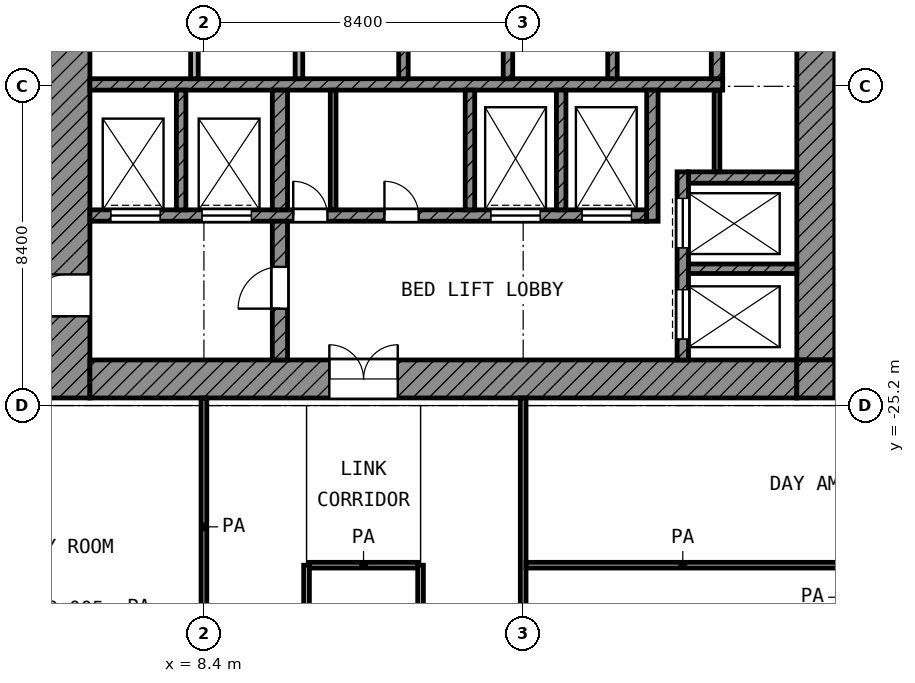
"""IFC4 building model, lengths in metres.
Left out: names, types, materials, properties, quantities, classifications, styles, units other than length and angle.
Written with IfcOpenShell. Run it as: python <this file> out.ifc"""

import sys

from ifc_helpers import new_model, si_unit, direction, frame, frame_2d, origin, place, context, subcontext, project, spatial, rectangle, extrude, element, fill, save


model = new_model("IFC4")
c1 = context("Model", 3, precision=1e-05, world=origin(), true_north=direction((0.0, 1.0)))
c2 = subcontext(c1, "Body", "Model", "MODEL_VIEW")
j1 = project(units=[si_unit("LENGTHUNIT", "METRE"), si_unit("PLANEANGLEUNIT", "RADIAN")], contexts=[c1])
p1 = place(None, origin())
s1 = spatial("IfcSite", under=j1, at=p1, CompositionType="ELEMENT")
p2 = place(p1, origin())
s2 = spatial("IfcBuilding", under=s1, at=p2, CompositionType="ELEMENT")
p3 = place(p2, frame((0.0, 0.0, 128.2)))
s3 = spatial("IfcBuildingStorey", under=s2, at=p3, CompositionType="ELEMENT", Elevation=128.2)
p4 = place(p3, frame((4.8, -25.0, 0.0), z_axis=(0.0, 0.0, 1.0), x_axis=(0.0, 1.0, 0.0)))
e1 = element("IfcWall", 1, at=p4, inside=s3, PredefinedType="SHEAR", context=c2, shape_type="SweptSolid", body=[
    extrude(rectangle(XDim=19.6, YDim=1.2, at=frame_2d((9.8, 0.0))), origin(), (0.0, 0.0, 1.0), 3.6),
])
p5 = place(p4, frame((11.45, 0.0, 0.0)))
e2 = element("IfcOpeningElement", 2, at=p5, cuts=e1, PredefinedType="OPENING", context=c2, shape_type="SweptSolid", body=[
    extrude(rectangle(XDim=1.1, YDim=2.1, at=frame_2d((0.55, 1.05))), frame((0.0, 0.61, 0.0), z_axis=(0.0, -1.0, 0.0), x_axis=(1.0, 0.0, 0.0)), (0.0, 0.0, 1.0), 1.22),
])
p6 = place(p4, frame((2.15, 0.0, 0.0)))
e3 = element("IfcOpeningElement", 3, at=p6, cuts=e1, PredefinedType="OPENING", context=c2, shape_type="SweptSolid", body=[
    extrude(rectangle(XDim=1.1, YDim=2.1, at=frame_2d((0.55, 1.05))), frame((0.0, 0.61, 0.0), z_axis=(0.0, -1.0, 0.0), x_axis=(1.0, 0.0, 0.0)), (0.0, 0.0, 1.0), 1.22),
])
p7 = place(p3, frame((24.5, -24.0, 0.0), z_axis=(0.0, 0.0, 1.0), x_axis=(0.0, 1.0, 0.0)))
e4 = element("IfcWall", 4, at=p7, inside=s3, PredefinedType="SHEAR", context=c2, shape_type="SweptSolid", body=[
    extrude(rectangle(XDim=18.6, YDim=1.0, at=frame_2d((9.3, 0.0))), origin(), (0.0, 0.0, 1.0), 3.6),
])
p8 = place(p7, frame((10.5, 0.0, 0.0)))
e5 = element("IfcOpeningElement", 5, at=p8, cuts=e4, PredefinedType="OPENING", context=c2, shape_type="SweptSolid", body=[
    extrude(rectangle(XDim=1.8, YDim=2.1, at=frame_2d((0.9, 1.05))), frame((0.0, 0.51, 0.0), z_axis=(0.0, -1.0, 0.0), x_axis=(1.0, 0.0, 0.0)), (0.0, 0.0, 1.0), 1.02),
])
p9 = place(p3, frame((5.4, -24.5, 0.0), z_axis=(0.0, 0.0, 1.0), x_axis=(1.0, 0.0, 0.0)))
e6 = element("IfcWall", 6, at=p9, inside=s3, PredefinedType="SHEAR", context=c2, shape_type="SweptSolid", body=[
    extrude(rectangle(XDim=18.6, YDim=1.0, at=frame_2d((9.3, 0.0))), origin(), (0.0, 0.0, 1.0), 3.6),
])
p10 = place(p9, frame((6.3, 0.0, 0.0)))
e7 = element("IfcOpeningElement", 7, at=p10, cuts=e6, PredefinedType="OPENING", context=c2, shape_type="SweptSolid", body=[
    extrude(rectangle(XDim=1.8, YDim=2.1, at=frame_2d((0.9, 1.05))), frame((0.0, 0.51, 0.0), z_axis=(0.0, -1.0, 0.0), x_axis=(1.0, 0.0, 0.0)), (0.0, 0.0, 1.0), 1.02),
])
p11 = place(p3, frame((24.5, -25.0, 0.0), z_axis=(0.0, 0.0, 1.0), x_axis=(0.0, 1.0, 0.0)))
e8 = element("IfcWall", 8, at=p11, inside=s3, PredefinedType="SHEAR", context=c2, shape_type="SweptSolid", body=[
    extrude(rectangle(XDim=1.0, YDim=1.0, at=frame_2d((0.5, 0.0))), origin(), (0.0, 0.0, 1.0), 3.6),
])
p12 = place(p3, frame((5.4, -16.75, 0.0), z_axis=(0.0, 0.0, 1.0), x_axis=(1.0, 0.0, 0.0)))
e9 = element("IfcWall", 9, at=p12, inside=s3, PredefinedType="SHEAR", context=c2, shape_type="SweptSolid", body=[
    extrude(rectangle(XDim=16.65, YDim=0.3, at=frame_2d((8.325, 0.0))), origin(), (0.0, 0.0, 1.0), 3.6),
])
p13 = place(p3, frame((5.4, -20.2, 0.0), z_axis=(0.0, 0.0, 1.0), x_axis=(1.0, 0.0, 0.0)))
e10 = element("IfcWall", 10, at=p13, inside=s3, PredefinedType="SHEAR", context=c2, shape_type="SweptSolid", body=[
    extrude(rectangle(XDim=14.65, YDim=0.3, at=frame_2d((7.325, 0.0))), origin(), (0.0, 0.0, 1.0), 3.6),
])
p14 = place(p13, frame((10.55, 0.0, 0.0)))
e11 = element("IfcOpeningElement", 11, at=p14, cuts=e10, PredefinedType="OPENING", context=c2, shape_type="SweptSolid", body=[
    extrude(rectangle(XDim=1.3, YDim=2.1, at=frame_2d((0.65, 1.05))), frame((0.0, 0.16, 0.0), z_axis=(0.0, -1.0, 0.0), x_axis=(1.0, 0.0, 0.0)), (0.0, 0.0, 1.0), 0.32),
])
p15 = place(p13, frame((12.95, 0.0, 0.0)))
e12 = element("IfcOpeningElement", 12, at=p15, cuts=e10, PredefinedType="OPENING", context=c2, shape_type="SweptSolid", body=[
    extrude(rectangle(XDim=1.3, YDim=2.1, at=frame_2d((0.65, 1.05))), frame((0.0, 0.16, 0.0), z_axis=(0.0, -1.0, 0.0), x_axis=(1.0, 0.0, 0.0)), (0.0, 0.0, 1.0), 0.32),
])
p16 = place(p13, frame((0.55, 0.0, 0.0)))
e13 = element("IfcOpeningElement", 13, at=p16, cuts=e10, PredefinedType="OPENING", context=c2, shape_type="SweptSolid", body=[
    extrude(rectangle(XDim=1.3, YDim=2.1, at=frame_2d((0.65, 1.05))), frame((0.0, 0.16, 0.0), z_axis=(0.0, -1.0, 0.0), x_axis=(1.0, 0.0, 0.0)), (0.0, 0.0, 1.0), 0.32),
])
p17 = place(p13, frame((2.95, 0.0, 0.0)))
e14 = element("IfcOpeningElement", 14, at=p17, cuts=e10, PredefinedType="OPENING", context=c2, shape_type="SweptSolid", body=[
    extrude(rectangle(XDim=1.3, YDim=2.1, at=frame_2d((0.65, 1.05))), frame((0.0, 0.16, 0.0), z_axis=(0.0, -1.0, 0.0), x_axis=(1.0, 0.0, 0.0)), (0.0, 0.0, 1.0), 0.32),
])
p18 = place(p13, frame((5.35, 0.0, 0.0)))
e15 = element("IfcOpeningElement", 15, at=p18, cuts=e10, PredefinedType="OPENING", context=c2, shape_type="SweptSolid", body=[
    extrude(rectangle(XDim=0.9, YDim=2.1, at=frame_2d((0.45, 1.05))), frame((0.0, 0.16, 0.0), z_axis=(0.0, -1.0, 0.0), x_axis=(1.0, 0.0, 0.0)), (0.0, 0.0, 1.0), 0.32),
])
p19 = place(p13, frame((7.75, 0.0, 0.0)))
e16 = element("IfcOpeningElement", 16, at=p19, cuts=e10, PredefinedType="OPENING", context=c2, shape_type="SweptSolid", body=[
    extrude(rectangle(XDim=0.9, YDim=2.1, at=frame_2d((0.45, 1.05))), frame((0.0, 0.16, 0.0), z_axis=(0.0, -1.0, 0.0), x_axis=(1.0, 0.0, 0.0)), (0.0, 0.0, 1.0), 0.32),
])
p20 = place(p3, frame((10.4, -24.0, 0.0), z_axis=(0.0, 0.0, 1.0), x_axis=(0.0, 1.0, 0.0)))
e17 = element("IfcWall", 17, at=p20, inside=s3, PredefinedType="SHEAR", context=c2, shape_type="SweptSolid", body=[
    extrude(rectangle(XDim=3.65, YDim=0.4, at=frame_2d((1.825, 0.0))), origin(), (0.0, 0.0, 1.0), 3.6),
])
p21 = place(p20, frame((1.35, 0.0, 0.0)))
e18 = element("IfcOpeningElement", 18, at=p21, cuts=e17, PredefinedType="OPENING", context=c2, shape_type="SweptSolid", body=[
    extrude(rectangle(XDim=1.1, YDim=2.1, at=frame_2d((0.55, 1.05))), frame((0.0, 0.21, 0.0), z_axis=(0.0, -1.0, 0.0), x_axis=(1.0, 0.0, 0.0)), (0.0, 0.0, 1.0), 0.42),
])
p22 = place(p3, frame((10.4, -20.05, 0.0), z_axis=(0.0, 0.0, 1.0), x_axis=(0.0, 1.0, 0.0)))
e19 = element("IfcWall", 19, at=p22, inside=s3, PredefinedType="SHEAR", context=c2, shape_type="SweptSolid", body=[
    extrude(rectangle(XDim=3.15, YDim=0.4, at=frame_2d((1.575, 0.0))), origin(), (0.0, 0.0, 1.0), 3.6),
])
p23 = place(p3, frame((20.2, -20.35, 0.0), z_axis=(0.0, 0.0, 1.0), x_axis=(0.0, 1.0, 0.0)))
e20 = element("IfcWall", 20, at=p23, inside=s3, PredefinedType="SHEAR", context=c2, shape_type="SweptSolid", body=[
    extrude(rectangle(XDim=3.45, YDim=0.3, at=frame_2d((1.725, 0.0))), origin(), (0.0, 0.0, 1.0), 3.6),
])
p24 = place(p3, frame((21.9, -16.6, 0.0), z_axis=(0.0, 0.0, 1.0), x_axis=(0.0, 1.0, 0.0)))
e21 = element("IfcWall", 21, at=p24, inside=s3, PredefinedType="SHEAR", context=c2, shape_type="SweptSolid", body=[
    extrude(rectangle(XDim=2.35, YDim=0.3, at=frame_2d((1.175, 0.0))), origin(), (0.0, 0.0, 1.0), 3.6),
])
p25 = place(p3, frame((21.15, -19.2, 0.0), z_axis=(0.0, 0.0, 1.0), x_axis=(1.0, 0.0, 0.0)))
e22 = element("IfcWall", 22, at=p25, inside=s3, PredefinedType="SHEAR", context=c2, shape_type="SweptSolid", body=[
    extrude(rectangle(XDim=2.85, YDim=0.3, at=frame_2d((1.425, 0.0))), origin(), (0.0, 0.0, 1.0), 3.6),
])
p26 = place(p3, frame((21.0, -24.0, 0.0), z_axis=(0.0, 0.0, 1.0), x_axis=(0.0, 1.0, 0.0)))
e23 = element("IfcWall", 23, at=p26, inside=s3, PredefinedType="SHEAR", context=c2, shape_type="SweptSolid", body=[
    extrude(rectangle(XDim=4.95, YDim=0.3, at=frame_2d((2.475, 0.0))), origin(), (0.0, 0.0, 1.0), 3.6),
])
p27 = place(p26, frame((2.95, 0.0, 0.0)))
e24 = element("IfcOpeningElement", 24, at=p27, cuts=e23, PredefinedType="OPENING", context=c2, shape_type="SweptSolid", body=[
    extrude(rectangle(XDim=1.3, YDim=2.1, at=frame_2d((0.65, 1.05))), frame((0.0, 0.16, 0.0), z_axis=(0.0, -1.0, 0.0), x_axis=(1.0, 0.0, 0.0)), (0.0, 0.0, 1.0), 0.32),
])
p28 = place(p26, frame((0.55, 0.0, 0.0)))
e25 = element("IfcOpeningElement", 25, at=p28, cuts=e23, PredefinedType="OPENING", context=c2, shape_type="SweptSolid", body=[
    extrude(rectangle(XDim=1.3, YDim=2.1, at=frame_2d((0.65, 1.05))), frame((0.0, 0.16, 0.0), z_axis=(0.0, -1.0, 0.0), x_axis=(1.0, 0.0, 0.0)), (0.0, 0.0, 1.0), 0.32),
])
p29 = place(p3, frame((21.15, -21.6, 0.0), z_axis=(0.0, 0.0, 1.0), x_axis=(1.0, 0.0, 0.0)))
e26 = element("IfcWall", 26, at=p29, inside=s3, PredefinedType="SHEAR", context=c2, shape_type="SweptSolid", body=[
    extrude(rectangle(XDim=2.85, YDim=0.25, at=frame_2d((1.425, 0.0))), origin(), (0.0, 0.0, 1.0), 3.6),
])
for number, where, z_axis, x_axis in (
    (27, (7.8, -20.05, 0.0), (0.0, 0.0, 1.0), (0.0, 1.0, 0.0)),
    (28, (15.4, -20.05, 0.0), (0.0, 0.0, 1.0), (0.0, 1.0, 0.0)),
    (29, (17.8, -20.05, 0.0), (0.0, 0.0, 1.0), (0.0, 1.0, 0.0)),
):
    element("IfcWall", number, at=place(p3, frame(where, z_axis=z_axis, x_axis=x_axis)), inside=s3, PredefinedType="SHEAR", context=c2, shape_type="SweptSolid", body=[
        extrude(rectangle(XDim=3.15, YDim=0.25, at=frame_2d((1.575, 0.0))), origin(), (0.0, 0.0, 1.0), 3.6),
    ])
for number, where, z_axis, x_axis in (
    (30, (8.15, -16.6, 0.0), (0.0, 0.0, 1.0), (0.0, 1.0, 0.0)),
    (31, (10.9, -16.6, 0.0), (0.0, 0.0, 1.0), (0.0, 1.0, 0.0)),
):
    element("IfcWall", number, at=place(p3, frame(where, z_axis=z_axis, x_axis=x_axis)), inside=s3, PredefinedType="PARTITIONING", context=c2, shape_type="SweptSolid", body=[
        extrude(rectangle(XDim=2.35, YDim=0.2, at=frame_2d((1.175, 0.0))), origin(), (0.0, 0.0, 1.0), 3.6),
    ])
for number, where, z_axis, x_axis in (
    (32, (13.65, -16.6, 0.0), (0.0, 0.0, 1.0), (0.0, 1.0, 0.0)),
    (33, (16.4, -16.6, 0.0), (0.0, 0.0, 1.0), (0.0, 1.0, 0.0)),
    (34, (19.15, -16.6, 0.0), (0.0, 0.0, 1.0), (0.0, 1.0, 0.0)),
):
    element("IfcWall", number, at=place(p3, frame(where, z_axis=z_axis, x_axis=x_axis)), inside=s3, PredefinedType="SHEAR", context=c2, shape_type="SweptSolid", body=[
        extrude(rectangle(XDim=2.35, YDim=0.25, at=frame_2d((1.175, 0.0))), origin(), (0.0, 0.0, 1.0), 3.6),
    ])
p30 = place(p3, frame((21.9, -19.05, 0.0), z_axis=(0.0, 0.0, 1.0), x_axis=(0.0, 1.0, 0.0)))
e35 = element("IfcWall", 35, at=p30, inside=s3, PredefinedType="PARTITIONING", context=c2, shape_type="SweptSolid", body=[
    extrude(rectangle(XDim=2.15, YDim=0.15, at=frame_2d((1.075, 0.0))), origin(), (0.0, 0.0, 1.0), 3.6),
])
p31 = place(p3, frame((11.8, -20.05, 0.0), z_axis=(0.0, 0.0, 1.0), x_axis=(0.0, 1.0, 0.0)))
e36 = element("IfcWall", 36, at=p31, inside=s3, PredefinedType="PARTITIONING", context=c2, shape_type="SweptSolid", body=[
    extrude(rectangle(XDim=3.15, YDim=0.15, at=frame_2d((1.575, 0.0))), origin(), (0.0, 0.0, 1.0), 3.6),
])
p32 = place(p3, frame((11.175, -29.4, 0.0), z_axis=(0.0, 0.0, 1.0), x_axis=(1.0, 0.0, 0.0)))
e37 = element("IfcWall", 37, at=p32, inside=s3, PredefinedType="PARTITIONING", context=c2, shape_type="SweptSolid", body=[
    extrude(rectangle(XDim=2.85, YDim=0.15, at=frame_2d((1.425, 0.0))), origin(), (0.0, 0.0, 1.0), 3.6),
])
p33 = place(p3, frame((16.875, -29.4, 0.0), z_axis=(0.0, 0.0, 1.0), x_axis=(1.0, 0.0, 0.0)))
e38 = element("IfcWall", 38, at=p33, inside=s3, PredefinedType="PARTITIONING", context=c2, shape_type="SweptSolid", body=[
    extrude(rectangle(XDim=8.25, YDim=0.15, at=frame_2d((4.125, 0.0))), origin(), (0.0, 0.0, 1.0), 3.6),
])
p34 = place(p3, frame((8.4, -31.782, 0.0), z_axis=(0.0, 0.0, 1.0), x_axis=(0.0, 1.0, 0.0)))
e39 = element("IfcWall", 39, at=p34, inside=s3, PredefinedType="PARTITIONING", context=c2, shape_type="SweptSolid", body=[
    extrude(rectangle(XDim=6.782, YDim=0.15, at=frame_2d((3.391, 0.0))), origin(), (0.0, 0.0, 1.0), 3.6),
])
p35 = place(p3, frame((11.1, -46.7, 0.0), z_axis=(0.0, 0.0, 1.0), x_axis=(0.0, 1.0, 0.0)))
e40 = element("IfcWall", 40, at=p35, inside=s3, PredefinedType="PARTITIONING", context=c2, shape_type="SweptSolid", body=[
    extrude(rectangle(XDim=17.3, YDim=0.15, at=frame_2d((8.65, 0.0))), origin(), (0.0, 0.0, 1.0), 3.6),
])
p36 = place(p35, frame((14.7, 0.0, 0.0)))
e41 = element("IfcOpeningElement", 41, at=p36, cuts=e40, PredefinedType="OPENING", context=c2, shape_type="SweptSolid", body=[
    extrude(rectangle(XDim=1.0, YDim=2.1, at=frame_2d((0.5, 1.05))), frame((0.0, 0.085, 0.0), z_axis=(0.0, -1.0, 0.0), x_axis=(1.0, 0.0, 0.0)), (0.0, 0.0, 1.0), 0.17),
])
p37 = place(p3, frame((14.1, -46.7, 0.0), z_axis=(0.0, 0.0, 1.0), x_axis=(0.0, 1.0, 0.0)))
e42 = element("IfcWall", 42, at=p37, inside=s3, PredefinedType="PARTITIONING", context=c2, shape_type="SweptSolid", body=[
    extrude(rectangle(XDim=17.3, YDim=0.15, at=frame_2d((8.65, 0.0))), origin(), (0.0, 0.0, 1.0), 3.6),
])
p38 = place(p37, frame((5.9, 0.0, 0.0)))
e43 = element("IfcOpeningElement", 43, at=p38, cuts=e42, PredefinedType="OPENING", context=c2, shape_type="SweptSolid", body=[
    extrude(rectangle(XDim=1.2, YDim=2.1, at=frame_2d((0.6, 1.05))), frame((0.0, 0.085, 0.0), z_axis=(0.0, -1.0, 0.0), x_axis=(1.0, 0.0, 0.0)), (0.0, 0.0, 1.0), 0.17),
])
p39 = place(p3, frame((16.8, -58.72, 0.0), z_axis=(0.0, 0.0, 1.0), x_axis=(0.0, 1.0, 0.0)))
e44 = element("IfcWall", 44, at=p39, inside=s3, PredefinedType="PARTITIONING", context=c2, shape_type="SweptSolid", body=[
    extrude(rectangle(XDim=33.72, YDim=0.15, at=frame_2d((16.86, 0.0))), origin(), (0.0, 0.0, 1.0), 2.7),
])
p40 = place(p39, frame((25.72, 0.0, 0.0)))
e45 = element("IfcOpeningElement", 45, at=p40, cuts=e44, PredefinedType="OPENING", context=c2, shape_type="SweptSolid", body=[
    extrude(rectangle(XDim=1.5, YDim=2.1, at=frame_2d((0.75, 1.05))), frame((0.0, 0.085, 0.0), z_axis=(0.0, -1.0, 0.0), x_axis=(1.0, 0.0, 0.0)), (0.0, 0.0, 1.0), 0.17),
])
p41 = place(p39, frame((17.72, 0.0, 0.0)))
e46 = element("IfcOpeningElement", 46, at=p41, cuts=e44, PredefinedType="OPENING", context=c2, shape_type="SweptSolid", body=[
    extrude(rectangle(XDim=1.2, YDim=2.1, at=frame_2d((0.6, 1.05))), frame((0.0, 0.085, 0.0), z_axis=(0.0, -1.0, 0.0), x_axis=(1.0, 0.0, 0.0)), (0.0, 0.0, 1.0), 0.17),
])
p42 = place(p39, frame((14.92, 0.0, 0.0)))
e47 = element("IfcOpeningElement", 47, at=p42, cuts=e44, PredefinedType="OPENING", context=c2, shape_type="SweptSolid", body=[
    extrude(rectangle(XDim=1.2, YDim=2.1, at=frame_2d((0.6, 1.05))), frame((0.0, 0.085, 0.0), z_axis=(0.0, -1.0, 0.0), x_axis=(1.0, 0.0, 0.0)), (0.0, 0.0, 1.0), 0.17),
])
p43 = place(p39, frame((9.02, 0.0, 0.0)))
e48 = element("IfcOpeningElement", 48, at=p43, cuts=e44, PredefinedType="OPENING", context=c2, shape_type="SweptSolid", body=[
    extrude(rectangle(XDim=0.9, YDim=2.1, at=frame_2d((0.45, 1.05))), frame((0.0, 0.085, 0.0), z_axis=(0.0, -1.0, 0.0), x_axis=(1.0, 0.0, 0.0)), (0.0, 0.0, 1.0), 0.17),
])
p44 = place(p39, frame((3.37, 0.0, 0.0)))
e49 = element("IfcOpeningElement", 49, at=p44, cuts=e44, PredefinedType="OPENING", context=c2, shape_type="SweptSolid", body=[
    extrude(rectangle(XDim=1.5, YDim=2.1, at=frame_2d((0.75, 1.05))), frame((0.0, 0.085, 0.0), z_axis=(0.0, -1.0, 0.0), x_axis=(1.0, 0.0, 0.0)), (0.0, 0.0, 1.0), 0.17),
])
p45 = place(p27, origin())
e50 = element("IfcDoor", 50, at=p45, inside=s3, OperationType="DOUBLE_DOOR_SLIDING", PredefinedType="DOOR", context=c2, shape_type="SweptSolid", body=[
    extrude(rectangle(XDim=1.3, YDim=2.1, at=frame_2d((0.65, 1.05))), frame((0.0, 0.025, 0.0), z_axis=(0.0, -1.0, 0.0), x_axis=(1.0, 0.0, 0.0)), (0.0, 0.0, 1.0), 0.05),
])
fill(e24, e50)
p46 = place(p28, origin())
e51 = element("IfcDoor", 51, at=p46, inside=s3, OperationType="DOUBLE_DOOR_SLIDING", PredefinedType="DOOR", context=c2, shape_type="SweptSolid", body=[
    extrude(rectangle(XDim=1.3, YDim=2.1, at=frame_2d((0.65, 1.05))), frame((0.0, 0.025, 0.0), z_axis=(0.0, -1.0, 0.0), x_axis=(1.0, 0.0, 0.0)), (0.0, 0.0, 1.0), 0.05),
])
fill(e25, e51)
p47 = place(p14, origin())
e52 = element("IfcDoor", 52, at=p47, inside=s3, OperationType="DOUBLE_DOOR_SLIDING", PredefinedType="DOOR", context=c2, shape_type="SweptSolid", body=[
    extrude(rectangle(XDim=1.3, YDim=2.1, at=frame_2d((0.65, 1.05))), frame((0.0, 0.025, 0.0), z_axis=(0.0, -1.0, 0.0), x_axis=(1.0, 0.0, 0.0)), (0.0, 0.0, 1.0), 0.05),
])
fill(e11, e52)
p48 = place(p15, origin())
e53 = element("IfcDoor", 53, at=p48, inside=s3, OperationType="DOUBLE_DOOR_SLIDING", PredefinedType="DOOR", context=c2, shape_type="SweptSolid", body=[
    extrude(rectangle(XDim=1.3, YDim=2.1, at=frame_2d((0.65, 1.05))), frame((0.0, 0.025, 0.0), z_axis=(0.0, -1.0, 0.0), x_axis=(1.0, 0.0, 0.0)), (0.0, 0.0, 1.0), 0.05),
])
fill(e12, e53)
p49 = place(p16, origin())
e54 = element("IfcDoor", 54, at=p49, inside=s3, OperationType="DOUBLE_DOOR_SLIDING", PredefinedType="DOOR", context=c2, shape_type="SweptSolid", body=[
    extrude(rectangle(XDim=1.3, YDim=2.1, at=frame_2d((0.65, 1.05))), frame((0.0, 0.025, 0.0), z_axis=(0.0, -1.0, 0.0), x_axis=(1.0, 0.0, 0.0)), (0.0, 0.0, 1.0), 0.05),
])
fill(e13, e54)
p50 = place(p17, origin())
e55 = element("IfcDoor", 55, at=p50, inside=s3, OperationType="DOUBLE_DOOR_SLIDING", PredefinedType="DOOR", context=c2, shape_type="SweptSolid", body=[
    extrude(rectangle(XDim=1.3, YDim=2.1, at=frame_2d((0.65, 1.05))), frame((0.0, 0.025, 0.0), z_axis=(0.0, -1.0, 0.0), x_axis=(1.0, 0.0, 0.0)), (0.0, 0.0, 1.0), 0.05),
])
fill(e14, e55)
p51 = place(p6, origin())
e56 = element("IfcDoor", 56, at=p51, inside=s3, OperationType="SINGLE_SWING_LEFT", PredefinedType="DOOR", context=c2, shape_type="SweptSolid", body=[
    extrude(rectangle(XDim=1.1, YDim=2.1, at=frame_2d((0.55, 1.05))), frame((0.0, 0.025, 0.0), z_axis=(0.0, -1.0, 0.0), x_axis=(1.0, 0.0, 0.0)), (0.0, 0.0, 1.0), 0.05),
])
fill(e3, e56)
p52 = place(p21, origin())
e57 = element("IfcDoor", 57, at=p52, inside=s3, OperationType="SINGLE_SWING_LEFT", PredefinedType="DOOR", context=c2, shape_type="SweptSolid", body=[
    extrude(rectangle(XDim=1.1, YDim=2.1, at=frame_2d((0.55, 1.05))), frame((0.0, 0.025, 0.0), z_axis=(0.0, -1.0, 0.0), x_axis=(1.0, 0.0, 0.0)), (0.0, 0.0, 1.0), 0.05),
])
fill(e18, e57)
p53 = place(p10, origin())
e58 = element("IfcDoor", 58, at=p53, inside=s3, OperationType="DOUBLE_DOOR_SINGLE_SWING", PredefinedType="DOOR", context=c2, shape_type="SweptSolid", body=[
    extrude(rectangle(XDim=1.8, YDim=2.1, at=frame_2d((0.9, 1.05))), frame((0.0, 0.025, 0.0), z_axis=(0.0, -1.0, 0.0), x_axis=(1.0, 0.0, 0.0)), (0.0, 0.0, 1.0), 0.05),
])
fill(e7, e58)
p54 = place(p18, origin())
e59 = element("IfcDoor", 59, at=p54, inside=s3, OperationType="SINGLE_SWING_LEFT", PredefinedType="DOOR", context=c2, shape_type="SweptSolid", body=[
    extrude(rectangle(XDim=0.9, YDim=2.1, at=frame_2d((0.45, 1.05))), frame((0.0, 0.025, 0.0), z_axis=(0.0, -1.0, 0.0), x_axis=(1.0, 0.0, 0.0)), (0.0, 0.0, 1.0), 0.05),
])
fill(e15, e59)
p55 = place(p19, origin())
e60 = element("IfcDoor", 60, at=p55, inside=s3, OperationType="SINGLE_SWING_LEFT", PredefinedType="DOOR", context=c2, shape_type="SweptSolid", body=[
    extrude(rectangle(XDim=0.9, YDim=2.1, at=frame_2d((0.45, 1.05))), frame((0.0, 0.025, 0.0), z_axis=(0.0, -1.0, 0.0), x_axis=(1.0, 0.0, 0.0)), (0.0, 0.0, 1.0), 0.05),
])
fill(e16, e60)
save(model, sys.argv[1])
